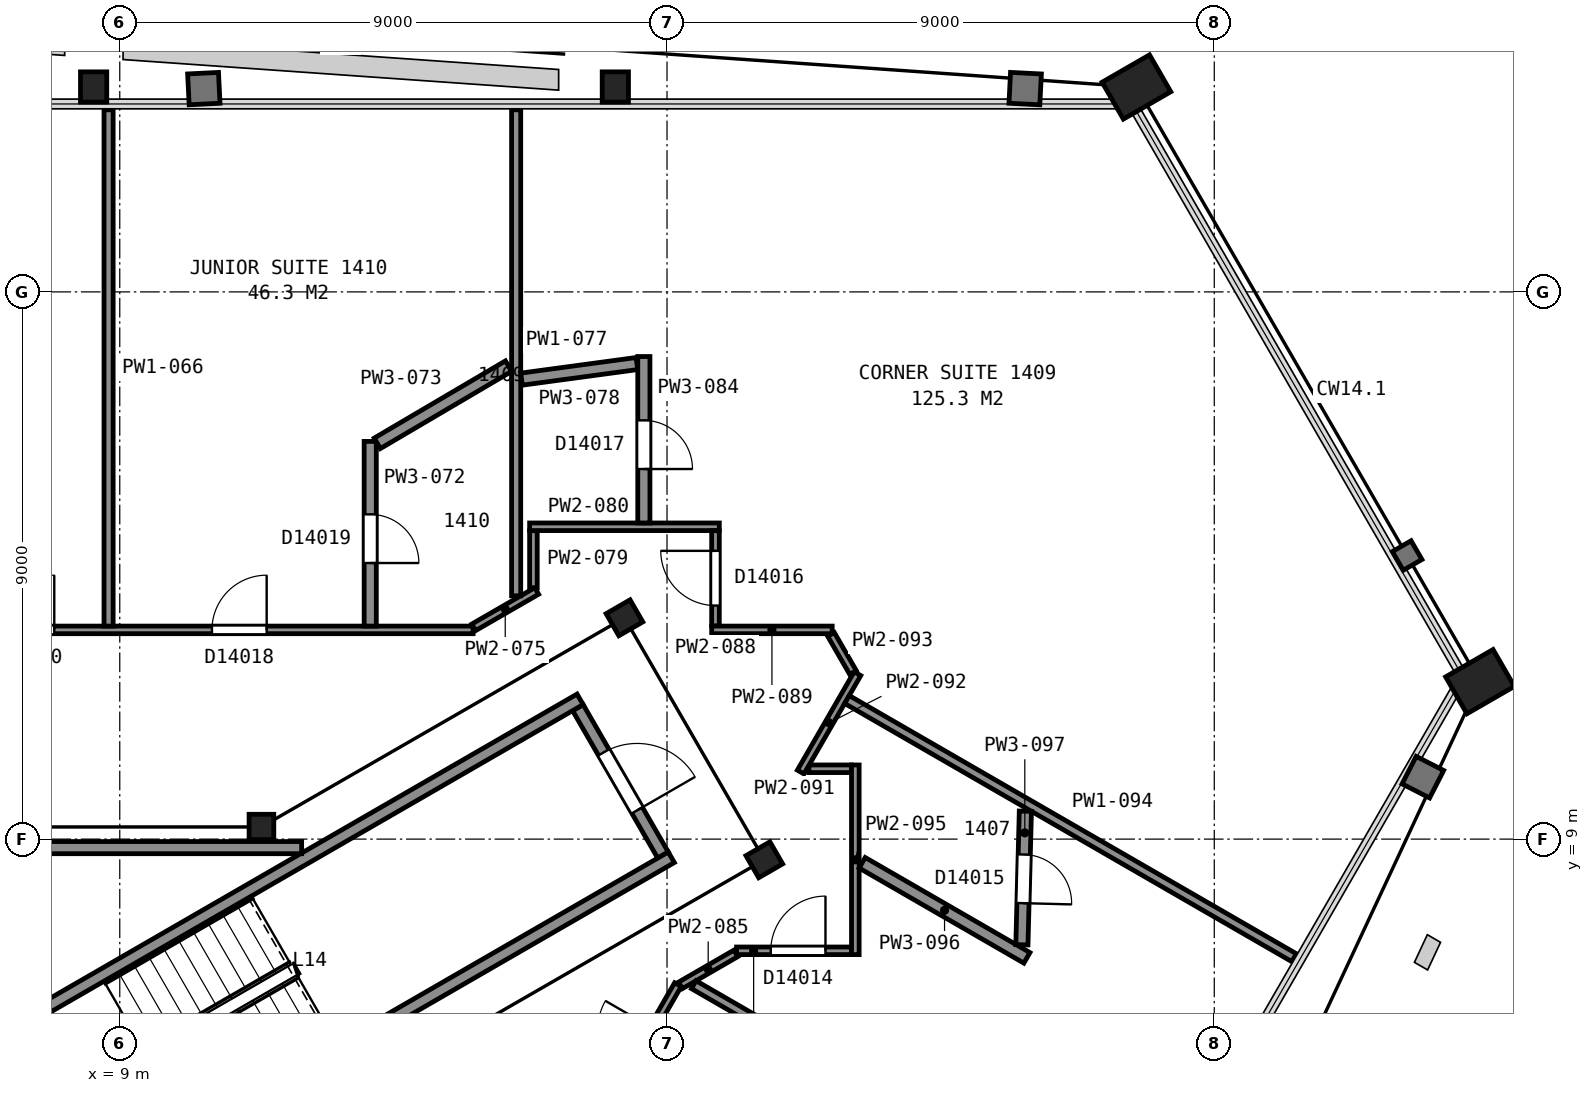
"""IFC4 building model, lengths in metres.
Left out: names, types, materials, properties, quantities, classifications, styles, units other than length and angle.
Written with IfcOpenShell. Run it as: python <this file> out.ifc"""

import sys

from ifc_helpers import new_model, si_unit, direction, frame, frame_2d, origin, origin_2d, place, context, subcontext, project, spatial, rectangle, hollow_rectangle, i_section, extrude, element, fill, save


model = new_model("IFC4")
c1 = context("Model", 3, precision=1e-05, world=origin(), true_north=direction((0.0, 1.0)))
c2 = subcontext(c1, "Body", "Model", "MODEL_VIEW")
j1 = project(units=[si_unit("LENGTHUNIT", "METRE"), si_unit("PLANEANGLEUNIT", "RADIAN")], contexts=[c1])
p1 = place(None, origin())
s1 = spatial("IfcSite", under=j1, at=p1, CompositionType="ELEMENT")
p2 = place(p1, origin())
s2 = spatial("IfcBuilding", under=s1, at=p2, CompositionType="ELEMENT")
p3 = place(p2, frame((0.0, 0.0, 65.6)))
s3 = spatial("IfcBuildingStorey", under=s2, at=p3, CompositionType="ELEMENT", Elevation=65.6)
p4 = place(p3, frame((25.72, 21.37, 0.04), z_axis=(0.0, 0.0, 1.0), x_axis=(0.5, -0.866025403784, 0.0)))
e1 = element("IfcColumn", 1, at=p4, inside=s3, PredefinedType="COLUMN", context=c2, shape_type="SweptSolid", body=[
    extrude(hollow_rectangle(XDim=0.7, YDim=0.9, WallThickness=0.065, at=origin_2d()), origin(), (0.0, 0.0, 1.0), 3.56),
])
for number, where, z_axis, x_axis in (
    (2, (17.15, 21.37, 0.025), (0.0, 0.0, 1.0), (1.0, 0.0, 0.0)),
    (3, (8.57, 21.37, 0.025), (0.0, 0.0, 1.0), (1.0, 0.0, 0.0)),
):
    element("IfcColumn", number, at=place(p3, frame(where, z_axis=z_axis, x_axis=x_axis)), inside=s3, PredefinedType="COLUMN", context=c2, shape_type="SweptSolid", body=[
        extrude(i_section(OverallWidth=0.432, OverallDepth=0.498, WebThickness=0.056, FlangeThickness=0.089, FilletRadius=0.015, at=origin_2d()), origin(), (0.0, 0.0, 1.0), 3.575),
    ])
p5 = place(p3, frame((31.37, 11.59, 0.04), z_axis=(0.0, 0.0, 1.0), x_axis=(0.5, -0.866025403784, 0.0)))
e4 = element("IfcColumn", 4, at=p5, inside=s3, PredefinedType="COLUMN", context=c2, shape_type="SweptSolid", body=[
    extrude(hollow_rectangle(XDim=0.7, YDim=0.9, WallThickness=0.065, at=origin_2d()), origin(), (0.0, 0.0, 1.0), 3.56),
])
for number, where, z_axis, x_axis in (
    (5, (19.6, 8.66, 0.0), (0.0, 0.0, 1.0), (0.5, -0.866, 0.0)),
    (6, (17.3, 12.64, 0.0), (0.0, 0.0, 1.0), (0.5, -0.866, 0.0)),
):
    element("IfcColumn", number, at=place(p3, frame(where, z_axis=z_axis, x_axis=x_axis)), inside=s3, PredefinedType="COLUMN", context=c2, shape_type="SweptSolid", body=[
        extrude(i_section(OverallWidth=0.419, OverallDepth=0.455, WebThickness=0.042, FlangeThickness=0.068, FilletRadius=0.015, at=origin_2d()), origin(), (0.0, 0.0, 1.0), 3.6),
    ])
p6 = place(p3, frame((11.33, 9.2, 0.0), z_axis=(0.0, 0.0, 1.0), x_axis=(1.0, 0.0, 0.0)))
e7 = element("IfcColumn", 7, at=p6, inside=s3, PredefinedType="COLUMN", context=c2, shape_type="SweptSolid", body=[
    extrude(i_section(OverallWidth=0.406, OverallDepth=0.417, WebThickness=0.03, FlangeThickness=0.048, FilletRadius=0.015, at=origin_2d()), origin(), (0.0, 0.0, 1.0), 3.6),
])
p7 = place(p3, frame((17.934, 8.738, 0.0), z_axis=(0.0, 0.0, 1.0), x_axis=(-0.49998411664, 0.866034573852, 0.0)))
e8 = element("IfcWall", 8, at=p7, inside=s3, PredefinedType="PARTITIONING", context=c2, shape_type="SweptSolid", body=[
    extrude(rectangle(XDim=2.8, YDim=0.2, at=frame_2d((1.4, 0.0))), origin(), (0.0, 0.0, 1.0), 3.35),
])
p8 = place(p7, frame((0.85, 0.0, 0.0)))
e9 = element("IfcOpeningElement", 9, at=p8, cuts=e8, PredefinedType="OPENING", context=c2, shape_type="SweptSolid", body=[
    extrude(rectangle(XDim=1.1, YDim=2.1, at=frame_2d((0.55, 1.05))), frame((0.0, 0.11, 0.0), z_axis=(0.0, -1.0, 0.0), x_axis=(1.0, 0.0, 0.0)), (0.0, 0.0, 1.0), 0.22),
])
for number, where, z_axis, x_axis in (
    (10, (6.178, 5.299, 0.0), (0.0, 0.0, 1.0), (0.866, 0.5, 0.0)),
    (11, (7.678, 2.701, 0.0), (0.0, 0.0, 1.0), (0.866, 0.5, 0.0)),
):
    element("IfcWall", number, at=place(p3, frame(where, z_axis=z_axis, x_axis=x_axis)), inside=s3, PredefinedType="PARTITIONING", context=c2, shape_type="SweptSolid", body=[
        extrude(rectangle(XDim=12.0, YDim=0.2, at=frame_2d((6.0, 0.0))), origin(), (0.0, 0.0, 1.0), 3.35),
    ])
p9 = place(p3, frame((6.177, 8.86, 0.0), z_axis=(0.0, 0.0, 1.0), x_axis=(1.0, 0.0, 0.0)))
e12 = element("IfcWall", 12, at=p9, inside=s3, PredefinedType="PARTITIONING", context=c2, shape_type="SweptSolid", body=[
    extrude(rectangle(XDim=5.814, YDim=0.2, at=frame_2d((2.907, 0.0))), origin(), (0.0, 0.0, 1.0), 3.35),
])
p10 = place(p3, frame((-14.811, 12.441, 0.0), z_axis=(0.0, 0.0, 1.0), x_axis=(1.0, 0.0, 0.0)))
e13 = element("IfcWall", 13, at=p10, inside=s3, PredefinedType="PARTITIONING", context=c2, shape_type="SweptSolid", body=[
    extrude(rectangle(XDim=29.621, YDim=0.125, at=frame_2d((14.811, 0.0))), origin(), (0.0, 0.0, 1.0), 2.613),
])
p11 = place(p10, frame((25.326, 0.0, 0.0)))
e14 = element("IfcOpeningElement", 14, at=p11, cuts=e13, PredefinedType="OPENING", context=c2, shape_type="SweptSolid", body=[
    extrude(rectangle(XDim=0.9, YDim=2.1, at=frame_2d((0.45, 1.05))), frame((0.0, 0.073, 0.0), z_axis=(0.0, -1.0, 0.0), x_axis=(1.0, 0.0, 0.0)), (0.0, 0.0, 1.0), 0.145),
])
p12 = place(p10, frame((21.833, 0.0, 0.0)))
e15 = element("IfcOpeningElement", 15, at=p12, cuts=e13, PredefinedType="OPENING", context=c2, shape_type="SweptSolid", body=[
    extrude(rectangle(XDim=0.9, YDim=2.1, at=frame_2d((0.45, 1.05))), frame((0.0, 0.073, 0.0), z_axis=(0.0, -1.0, 0.0), x_axis=(1.0, 0.0, 0.0)), (0.0, 0.0, 1.0), 0.145),
])
p13 = place(p10, frame((14.99, 0.0, 0.0)))
e16 = element("IfcOpeningElement", 16, at=p13, cuts=e13, PredefinedType="OPENING", context=c2, shape_type="SweptSolid", body=[
    extrude(rectangle(XDim=0.9, YDim=2.1, at=frame_2d((0.45, 1.05))), frame((0.0, 0.073, 0.0), z_axis=(0.0, -1.0, 0.0), x_axis=(1.0, 0.0, 0.0)), (0.0, 0.0, 1.0), 0.145),
])
p14 = place(p10, frame((12.128, 0.0, 0.0)))
e17 = element("IfcOpeningElement", 17, at=p14, cuts=e13, PredefinedType="OPENING", context=c2, shape_type="SweptSolid", body=[
    extrude(rectangle(XDim=0.9, YDim=2.1, at=frame_2d((0.45, 1.05))), frame((0.0, 0.073, 0.0), z_axis=(0.0, -1.0, 0.0), x_axis=(1.0, 0.0, 0.0)), (0.0, 0.0, 1.0), 0.145),
])
p15 = place(p10, frame((4.885, 0.0, 0.0)))
e18 = element("IfcOpeningElement", 18, at=p15, cuts=e13, PredefinedType="OPENING", context=c2, shape_type="SweptSolid", body=[
    extrude(rectangle(XDim=0.9, YDim=2.1, at=frame_2d((0.45, 1.05))), frame((0.0, 0.073, 0.0), z_axis=(0.0, -1.0, 0.0), x_axis=(1.0, 0.0, 0.0)), (0.0, 0.0, 1.0), 0.145),
])
p16 = place(p10, frame((2.241, 0.0, 0.0)))
e19 = element("IfcOpeningElement", 19, at=p16, cuts=e13, PredefinedType="OPENING", context=c2, shape_type="SweptSolid", body=[
    extrude(rectangle(XDim=0.9, YDim=2.1, at=frame_2d((0.45, 1.05))), frame((0.0, 0.073, 0.0), z_axis=(0.0, -1.0, 0.0), x_axis=(1.0, 0.0, 0.0)), (0.0, 0.0, 1.0), 0.145),
])
p17 = place(p3, frame((18.179, 6.606, 0.0), z_axis=(0.0, 0.0, 1.0), x_axis=(-0.500003973642, -0.866023109589, 0.0)))
e20 = element("IfcWall", 20, at=p17, inside=s3, PredefinedType="PARTITIONING", context=c2, shape_type="SweptSolid", body=[
    extrude(rectangle(XDim=28.826, YDim=0.125, at=frame_2d((14.413, 0.0))), origin(), (0.0, 0.0, 1.0), 2.613),
])
p18 = place(p17, frame((21.501, 0.0, 0.0)))
e21 = element("IfcOpeningElement", 21, at=p18, cuts=e20, PredefinedType="OPENING", context=c2, shape_type="SweptSolid", body=[
    extrude(rectangle(XDim=0.9, YDim=2.1, at=frame_2d((0.45, 1.05))), frame((0.0, 0.073, 0.0), z_axis=(0.0, -1.0, 0.0), x_axis=(1.0, 0.0, 0.0)), (0.0, 0.0, 1.0), 0.145),
])
p19 = place(p17, frame((18.894, 0.0, 0.0)))
e22 = element("IfcOpeningElement", 22, at=p19, cuts=e20, PredefinedType="OPENING", context=c2, shape_type="SweptSolid", body=[
    extrude(rectangle(XDim=0.9, YDim=2.1, at=frame_2d((0.45, 1.05))), frame((0.0, 0.073, 0.0), z_axis=(0.0, -1.0, 0.0), x_axis=(1.0, 0.0, 0.0)), (0.0, 0.0, 1.0), 0.145),
])
p20 = place(p17, frame((10.937, 0.0, 0.0)))
e23 = element("IfcOpeningElement", 23, at=p20, cuts=e20, PredefinedType="OPENING", context=c2, shape_type="SweptSolid", body=[
    extrude(rectangle(XDim=0.9, YDim=2.1, at=frame_2d((0.45, 1.05))), frame((0.0, 0.073, 0.0), z_axis=(0.0, -1.0, 0.0), x_axis=(1.0, 0.0, 0.0)), (0.0, 0.0, 1.0), 0.145),
])
p21 = place(p17, frame((7.535, 0.0, 0.0)))
e24 = element("IfcOpeningElement", 24, at=p21, cuts=e20, PredefinedType="OPENING", context=c2, shape_type="SweptSolid", body=[
    extrude(rectangle(XDim=0.9, YDim=2.1, at=frame_2d((0.45, 1.05))), frame((0.0, 0.073, 0.0), z_axis=(0.0, -1.0, 0.0), x_axis=(1.0, 0.0, 0.0)), (0.0, 0.0, 1.0), 0.145),
])
p22 = place(p17, frame((0.827, 0.0, 0.0)))
e25 = element("IfcOpeningElement", 25, at=p22, cuts=e20, PredefinedType="OPENING", context=c2, shape_type="SweptSolid", body=[
    extrude(rectangle(XDim=0.9, YDim=2.1, at=frame_2d((0.45, 1.05))), frame((0.0, 0.073, 0.0), z_axis=(0.0, -1.0, 0.0), x_axis=(1.0, 0.0, 0.0)), (0.0, 0.0, 1.0), 0.145),
])
p23 = place(p3, frame((8.816, 12.503, 0.0), z_axis=(0.0, 0.0, 1.0), x_axis=(0.0, 1.0, 0.0)))
e26 = element("IfcWall", 26, at=p23, inside=s3, PredefinedType="PARTITIONING", context=c2, shape_type="SweptSolid", body=[
    extrude(rectangle(XDim=8.492, YDim=0.15, at=frame_2d((4.246, 0.0))), origin(), (0.0, 0.0, 1.0), 2.613),
])
p24 = place(p3, frame((13.119, 15.541, 0.0), z_axis=(0.0, 0.0, 1.0), x_axis=(0.0, -1.0, 0.0)))
e27 = element("IfcWall", 27, at=p24, inside=s3, PredefinedType="PARTITIONING", context=c2, shape_type="SweptSolid", body=[
    extrude(rectangle(XDim=3.038, YDim=0.2, at=frame_2d((1.519, 0.0))), origin(), (0.0, 0.0, 1.0), 2.613),
])
p25 = place(p24, frame((1.2, 0.0, 0.0)))
e28 = element("IfcOpeningElement", 28, at=p25, cuts=e27, PredefinedType="OPENING", context=c2, shape_type="SweptSolid", body=[
    extrude(rectangle(XDim=0.8, YDim=2.1, at=frame_2d((0.4, 1.05))), frame((0.0, 0.11, 0.0), z_axis=(0.0, -1.0, 0.0), x_axis=(1.0, 0.0, 0.0)), (0.0, 0.0, 1.0), 0.22),
])
p26 = place(p3, frame((13.235, 15.51, 0.0), z_axis=(0.0, 0.0, 1.0), x_axis=(0.861909146735, 0.507062740471, 0.0)))
e29 = element("IfcWall", 29, at=p26, inside=s3, PredefinedType="PARTITIONING", context=c2, shape_type="SweptSolid", body=[
    extrude(rectangle(XDim=2.504, YDim=0.2, at=frame_2d((1.252, 0.0))), origin(), (0.0, 0.0, 1.0), 2.613),
])
p27 = place(p3, frame((14.822, 12.483, 0.0), z_axis=(0.0, 0.0, 1.0), x_axis=(0.866035997947, 0.499981649923, 0.0)))
e30 = element("IfcWall", 30, at=p27, inside=s3, PredefinedType="PARTITIONING", context=c2, shape_type="SweptSolid", body=[
    extrude(rectangle(XDim=1.196, YDim=0.125, at=frame_2d((0.598, 0.0))), origin(), (0.0, 0.0, 1.0), 2.613),
])
p28 = place(p3, frame((15.519, 13.001, 0.0), z_axis=(0.0, 0.0, 1.0), x_axis=(0.0, 1.0, 0.0)))
e31 = element("IfcWall", 31, at=p28, inside=s3, PredefinedType="PARTITIONING", context=c2, shape_type="SweptSolid", body=[
    extrude(rectangle(XDim=7.994, YDim=0.15, at=frame_2d((3.997, 0.0))), origin(), (0.0, 0.0, 1.0), 2.613),
])
p29 = place(p3, frame((15.607, 16.565, 0.0), z_axis=(0.0, 0.0, 1.0), x_axis=(0.990982367401, 0.133992341199, 0.0)))
e32 = element("IfcWall", 32, at=p29, inside=s3, PredefinedType="PARTITIONING", context=c2, shape_type="SweptSolid", body=[
    extrude(rectangle(XDim=1.915, YDim=0.2, at=frame_2d((0.958, 0.0))), origin(), (0.0, 0.0, 1.0), 2.613),
])
p30 = place(p3, frame((15.803, 13.135, 0.0), z_axis=(0.0, 0.0, 1.0), x_axis=(0.0, 1.0, 0.0)))
e33 = element("IfcWall", 33, at=p30, inside=s3, PredefinedType="PARTITIONING", context=c2, shape_type="SweptSolid", body=[
    extrude(rectangle(XDim=0.937, YDim=0.125, at=frame_2d((0.469, 0.0))), origin(), (0.0, 0.0, 1.0), 2.613),
])
p31 = place(p3, frame((15.74, 14.137, 0.0), z_axis=(0.0, 0.0, 1.0), x_axis=(1.0, 0.0, 0.0)))
e34 = element("IfcWall", 34, at=p31, inside=s3, PredefinedType="PARTITIONING", context=c2, shape_type="SweptSolid", body=[
    extrude(rectangle(XDim=3.119, YDim=0.125, at=frame_2d((1.56, 0.0))), origin(), (0.0, 0.0, 1.0), 2.613),
])
p32 = place(p3, frame((17.619, 14.199, 0.0), z_axis=(0.0, 0.0, 1.0), x_axis=(0.0, 1.0, 0.0)))
e35 = element("IfcWall", 35, at=p32, inside=s3, PredefinedType="PARTITIONING", context=c2, shape_type="SweptSolid", body=[
    extrude(rectangle(XDim=2.738, YDim=0.2, at=frame_2d((1.369, 0.0))), origin(), (0.0, 0.0, 1.0), 2.613),
])
p33 = place(p32, frame((0.887, 0.0, 0.0)))
e36 = element("IfcOpeningElement", 36, at=p33, cuts=e35, PredefinedType="OPENING", context=c2, shape_type="SweptSolid", body=[
    extrude(rectangle(XDim=0.8, YDim=2.1, at=frame_2d((0.4, 1.05))), frame((0.0, 0.11, 0.0), z_axis=(0.0, -1.0, 0.0), x_axis=(1.0, 0.0, 0.0)), (0.0, 0.0, 1.0), 0.22),
])
p34 = place(p3, frame((18.222, 6.594, 0.0), z_axis=(0.0, 0.0, 1.0), x_axis=(0.865876245925, 0.500258260045, 0.0)))
e37 = element("IfcWall", 37, at=p34, inside=s3, PredefinedType="PARTITIONING", context=c2, shape_type="SweptSolid", body=[
    extrude(rectangle(XDim=1.052, YDim=0.125, at=frame_2d((0.526, 0.0))), origin(), (0.0, 0.0, 1.0), 2.613),
])
p35 = place(p3, frame((18.44, 6.605, 0.0), z_axis=(0.0, 0.0, 1.0), x_axis=(0.866044499518, -0.49996692376, 0.0)))
e38 = element("IfcWall", 38, at=p35, inside=s3, PredefinedType="PARTITIONING", context=c2, shape_type="SweptSolid", body=[
    extrude(rectangle(XDim=8.328, YDim=0.15, at=frame_2d((4.164, 0.0))), origin(), (0.0, 0.0, 1.0), 2.613),
])
p36 = place(p3, frame((18.797, 14.072, 0.0), z_axis=(0.0, 0.0, 1.0), x_axis=(0.0, -1.0, 0.0)))
e39 = element("IfcWall", 39, at=p36, inside=s3, PredefinedType="PARTITIONING", context=c2, shape_type="SweptSolid", body=[
    extrude(rectangle(XDim=1.566, YDim=0.125, at=frame_2d((0.783, 0.0))), origin(), (0.0, 0.0, 1.0), 2.613),
])
p37 = place(p36, frame((0.331, 0.0, 0.0)))
e40 = element("IfcOpeningElement", 40, at=p37, cuts=e39, PredefinedType="OPENING", context=c2, shape_type="SweptSolid", body=[
    extrude(rectangle(XDim=0.9, YDim=2.1, at=frame_2d((0.45, 1.05))), frame((0.0, 0.073, 0.0), z_axis=(0.0, -1.0, 0.0), x_axis=(1.0, 0.0, 0.0)), (0.0, 0.0, 1.0), 0.145),
])
p38 = place(p3, frame((18.735, 12.441, 0.0), z_axis=(0.0, 0.0, 1.0), x_axis=(1.0, 0.0, 0.0)))
e41 = element("IfcWall", 41, at=p38, inside=s3, PredefinedType="PARTITIONING", context=c2, shape_type="SweptSolid", body=[
    extrude(rectangle(XDim=1.982, YDim=0.125, at=frame_2d((0.991, 0.0))), origin(), (0.0, 0.0, 1.0), 2.613),
])
p39 = place(p3, frame((21.032, 7.163, 0.0), z_axis=(0.0, 0.0, 1.0), x_axis=(-1.0, 0.0, 0.0)))
e42 = element("IfcWall", 42, at=p39, inside=s3, PredefinedType="PARTITIONING", context=c2, shape_type="SweptSolid", body=[
    extrude(rectangle(XDim=1.888, YDim=0.125, at=frame_2d((0.944, 0.0))), origin(), (0.0, 0.0, 1.0), 2.613),
])
p40 = place(p39, frame((0.426, 0.0, 0.0)))
e43 = element("IfcOpeningElement", 43, at=p40, cuts=e42, PredefinedType="OPENING", context=c2, shape_type="SweptSolid", body=[
    extrude(rectangle(XDim=0.9, YDim=2.1, at=frame_2d((0.45, 1.05))), frame((0.0, 0.073, 0.0), z_axis=(0.0, -1.0, 0.0), x_axis=(1.0, 0.0, 0.0)), (0.0, 0.0, 1.0), 0.145),
])
p41 = place(p3, frame((20.334, 10.157, 0.0), z_axis=(0.0, 0.0, 1.0), x_axis=(1.0, 0.0, 0.0)))
e44 = element("IfcWall", 44, at=p41, inside=s3, PredefinedType="PARTITIONING", context=c2, shape_type="SweptSolid", body=[
    extrude(rectangle(XDim=0.698, YDim=0.125, at=frame_2d((0.349, 0.0))), origin(), (0.0, 0.0, 1.0), 2.613),
])
p42 = place(p3, frame((20.198, 10.103, 0.0), z_axis=(0.0, 0.0, 1.0), x_axis=(0.500072997275, 0.865983254686, 0.0)))
e45 = element("IfcWall", 45, at=p42, inside=s3, PredefinedType="PARTITIONING", context=c2, shape_type="SweptSolid", body=[
    extrude(rectangle(XDim=1.869, YDim=0.125, at=frame_2d((0.935, 0.0))), origin(), (0.0, 0.0, 1.0), 2.613),
])
p43 = place(p3, frame((20.697, 12.367, 0.0), z_axis=(0.0, 0.0, 1.0), x_axis=(0.500238258503, -0.865887801468, 0.0)))
e46 = element("IfcWall", 46, at=p43, inside=s3, PredefinedType="PARTITIONING", context=c2, shape_type="SweptSolid", body=[
    extrude(rectangle(XDim=0.724, YDim=0.125, at=frame_2d((0.362, 0.0))), origin(), (0.0, 0.0, 1.0), 2.613),
])
p44 = place(p3, frame((20.959, 11.296, 0.0), z_axis=(0.0, 0.0, 1.0), x_axis=(0.866022790583, -0.50000452617, 0.0)))
e47 = element("IfcWall", 47, at=p44, inside=s3, PredefinedType="PARTITIONING", context=c2, shape_type="SweptSolid", body=[
    extrude(rectangle(XDim=8.491, YDim=0.15, at=frame_2d((4.246, 0.0))), origin(), (0.0, 0.0, 1.0), 2.613),
])
p45 = place(p3, frame((21.097, 7.101, 0.0), z_axis=(0.0, 0.0, 1.0), x_axis=(0.0, 1.0, 0.0)))
e48 = element("IfcWall", 48, at=p45, inside=s3, PredefinedType="PARTITIONING", context=c2, shape_type="SweptSolid", body=[
    extrude(rectangle(XDim=3.119, YDim=0.125, at=frame_2d((1.56, 0.0))), origin(), (0.0, 0.0, 1.0), 2.613),
])
p46 = place(p3, frame((21.209, 8.611, 0.0), z_axis=(0.0, 0.0, 1.0), x_axis=(0.866054327916, -0.499949898588, 0.0)))
e49 = element("IfcWall", 49, at=p46, inside=s3, PredefinedType="PARTITIONING", context=c2, shape_type="SweptSolid", body=[
    extrude(rectangle(XDim=3.128, YDim=0.2, at=frame_2d((1.564, 0.0))), origin(), (0.0, 0.0, 1.0), 2.613),
])
p47 = place(p3, frame((23.836, 7.262, 0.0), z_axis=(0.0, 0.0, 1.0), x_axis=(0.025988330811, 0.999662246292, 0.0)))
e50 = element("IfcWall", 50, at=p47, inside=s3, PredefinedType="PARTITIONING", context=c2, shape_type="SweptSolid", body=[
    extrude(rectangle(XDim=2.198, YDim=0.2, at=frame_2d((1.099, 0.0))), origin(), (0.0, 0.0, 1.0), 2.613),
])
p48 = place(p47, frame((0.685, 0.0, 0.0)))
e51 = element("IfcOpeningElement", 51, at=p48, cuts=e50, PredefinedType="OPENING", context=c2, shape_type="SweptSolid", body=[
    extrude(rectangle(XDim=0.8, YDim=2.1, at=frame_2d((0.4, 1.05))), frame((0.0, 0.11, 0.0), z_axis=(0.0, -1.0, 0.0), x_axis=(1.0, 0.0, 0.0)), (0.0, 0.0, 1.0), 0.22),
])
p49 = place(p8, origin())
e52 = element("IfcDoor", 52, at=p49, inside=s3, OperationType="SINGLE_SWING_LEFT", PredefinedType="DOOR", context=c2, shape_type="SweptSolid", body=[
    extrude(rectangle(XDim=1.1, YDim=2.1, at=frame_2d((0.55, 1.05))), frame((0.0, 0.025, 0.0), z_axis=(0.0, -1.0, 0.0), x_axis=(1.0, 0.0, 0.0)), (0.0, 0.0, 1.0), 0.05),
])
fill(e9, e52)
p50 = place(p11, origin())
e53 = element("IfcDoor", 53, at=p50, inside=s3, OperationType="SINGLE_SWING_RIGHT", PredefinedType="DOOR", context=c2, shape_type="SweptSolid", body=[
    extrude(rectangle(XDim=0.9, YDim=2.1, at=frame_2d((0.45, 1.05))), frame((0.0, 0.025, 0.0), z_axis=(0.0, -1.0, 0.0), x_axis=(1.0, 0.0, 0.0)), (0.0, 0.0, 1.0), 0.05),
])
fill(e14, e53)
p51 = place(p12, origin())
e54 = element("IfcDoor", 54, at=p51, inside=s3, OperationType="SINGLE_SWING_RIGHT", PredefinedType="DOOR", context=c2, shape_type="SweptSolid", body=[
    extrude(rectangle(XDim=0.9, YDim=2.1, at=frame_2d((0.45, 1.05))), frame((0.0, 0.025, 0.0), z_axis=(0.0, -1.0, 0.0), x_axis=(1.0, 0.0, 0.0)), (0.0, 0.0, 1.0), 0.05),
])
fill(e15, e54)
p52 = place(p25, origin())
e55 = element("IfcDoor", 55, at=p52, inside=s3, OperationType="SINGLE_SWING_RIGHT", PredefinedType="DOOR", context=c2, shape_type="SweptSolid", body=[
    extrude(rectangle(XDim=0.8, YDim=2.1, at=frame_2d((0.4, 1.05))), frame((0.0, 0.025, 0.0), z_axis=(0.0, -1.0, 0.0), x_axis=(1.0, 0.0, 0.0)), (0.0, 0.0, 1.0), 0.05),
])
fill(e28, e55)
p53 = place(p33, origin())
e56 = element("IfcDoor", 56, at=p53, inside=s3, OperationType="SINGLE_SWING_LEFT", PredefinedType="DOOR", context=c2, shape_type="SweptSolid", body=[
    extrude(rectangle(XDim=0.8, YDim=2.1, at=frame_2d((0.4, 1.05))), frame((0.0, 0.025, 0.0), z_axis=(0.0, -1.0, 0.0), x_axis=(1.0, 0.0, 0.0)), (0.0, 0.0, 1.0), 0.05),
])
fill(e36, e56)
p54 = place(p37, origin())
e57 = element("IfcDoor", 57, at=p54, inside=s3, OperationType="SINGLE_SWING_LEFT", PredefinedType="DOOR", context=c2, shape_type="SweptSolid", body=[
    extrude(rectangle(XDim=0.9, YDim=2.1, at=frame_2d((0.45, 1.05))), frame((0.0, 0.025, 0.0), z_axis=(0.0, -1.0, 0.0), x_axis=(1.0, 0.0, 0.0)), (0.0, 0.0, 1.0), 0.05),
])
fill(e40, e57)
p55 = place(p40, origin())
e58 = element("IfcDoor", 58, at=p55, inside=s3, OperationType="SINGLE_SWING_LEFT", PredefinedType="DOOR", context=c2, shape_type="SweptSolid", body=[
    extrude(rectangle(XDim=0.9, YDim=2.1, at=frame_2d((0.45, 1.05))), frame((0.0, 0.025, 0.0), z_axis=(0.0, -1.0, 0.0), x_axis=(1.0, 0.0, 0.0)), (0.0, 0.0, 1.0), 0.05),
])
fill(e43, e58)
p56 = place(p48, origin())
e59 = element("IfcDoor", 59, at=p56, inside=s3, OperationType="SINGLE_SWING_LEFT", PredefinedType="DOOR", context=c2, shape_type="SweptSolid", body=[
    extrude(rectangle(XDim=0.8, YDim=2.1, at=frame_2d((0.4, 1.05))), frame((0.0, 0.025, 0.0), z_axis=(0.0, -1.0, 0.0), x_axis=(1.0, 0.0, 0.0)), (0.0, 0.0, 1.0), 0.05),
])
fill(e51, e59)
save(model, sys.argv[1])
